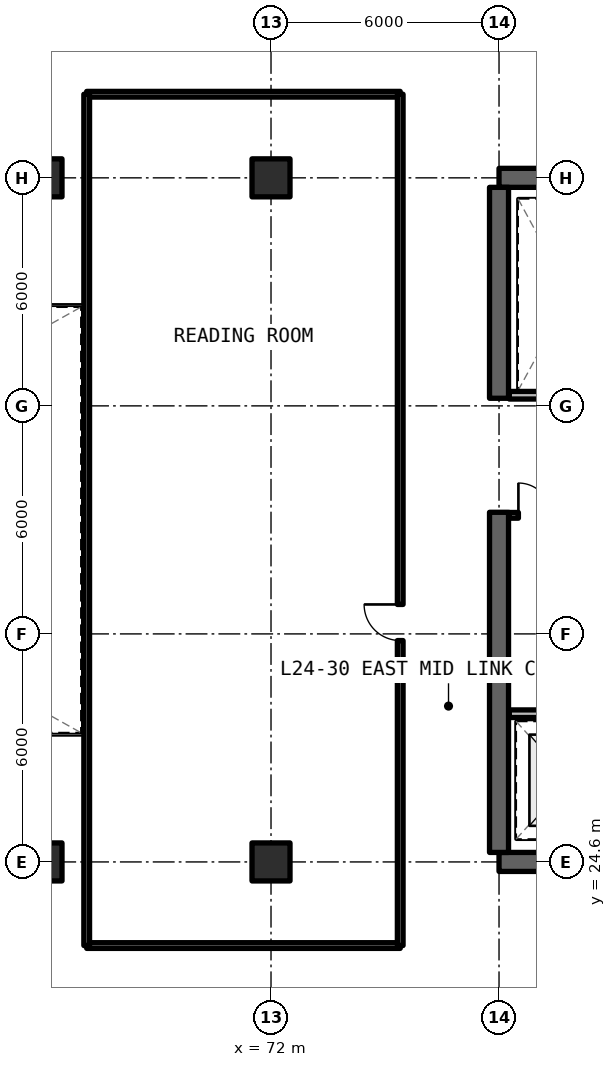
"""IFC4 building model, lengths in metres.
Left out: names, types, materials, properties, quantities, classifications, styles, units other than length and angle.
Written with IfcOpenShell. Run it as: python <this file> out.ifc"""

import sys

from ifc_helpers import new_model, si_unit, direction, frame, frame_2d, origin, origin_2d, place, context, subcontext, project, spatial, rectangle, extrude, element, fill, save


model = new_model("IFC4")
c1 = context("Model", 3, precision=1e-05, world=origin(), true_north=direction((0.0, 1.0)))
c2 = subcontext(c1, "Body", "Model", "MODEL_VIEW")
j1 = project(units=[si_unit("LENGTHUNIT", "METRE"), si_unit("PLANEANGLEUNIT", "RADIAN")], contexts=[c1])
p1 = place(None, origin())
s1 = spatial("IfcSite", under=j1, at=p1, CompositionType="ELEMENT")
p2 = place(p1, origin())
s2 = spatial("IfcBuilding", under=s1, at=p2, CompositionType="ELEMENT")
p3 = place(p2, frame((0.0, 0.0, 88.77)))
s3 = spatial("IfcBuildingStorey", under=s2, at=p3, CompositionType="ELEMENT", Elevation=88.77)
for number, where, z_axis, x_axis in (
    (1, (78.0, 24.6, 0.0), (0.0, 0.0, 1.0), (1.0, 0.0, 0.0)),
    (2, (90.0, 42.6, 0.0), (0.0, 0.0, 1.0), (-1.0, 0.0, 0.0)),
):
    element("IfcWall", number, at=place(p3, frame(where, z_axis=z_axis, x_axis=x_axis)), inside=s3, PredefinedType="SHEAR", context=c2, shape_type="SweptSolid", body=[
        extrude(rectangle(XDim=12.0, YDim=0.5, at=frame_2d((6.0, 0.0))), origin(), (0.0, 0.0, 1.0), 3.3),
    ])
p4 = place(p3, frame((78.0, 24.85, 0.0), z_axis=(0.0, 0.0, 1.0), x_axis=(0.0, 1.0, 0.0)))
e3 = element("IfcWall", 3, at=p4, inside=s3, PredefinedType="SHEAR", context=c2, shape_type="SweptSolid", body=[
    extrude(rectangle(XDim=8.95, YDim=0.5, at=frame_2d((4.475, 0.0))), origin(), (0.0, 0.0, 1.0), 3.3),
])
p5 = place(p3, frame((78.0, 36.8, 0.0), z_axis=(0.0, 0.0, 1.0), x_axis=(0.0, 1.0, 0.0)))
e4 = element("IfcWall", 4, at=p5, inside=s3, PredefinedType="SHEAR", context=c2, shape_type="SweptSolid", body=[
    extrude(rectangle(XDim=5.55, YDim=0.5, at=frame_2d((2.775, 0.0))), origin(), (0.0, 0.0, 1.0), 3.3),
])
for number, where, z_axis, x_axis in (
    (5, (66.0, 24.6, 0.0), (0.0, 0.0, 1.0), (1.0, 0.0, 0.0)),
    (6, (66.0, 42.6, 0.0), (0.0, 0.0, 1.0), (1.0, 0.0, 0.0)),
    (7, (72.0, 24.6, 0.0), (0.0, 0.0, 1.0), (1.0, 0.0, 0.0)),
    (8, (72.0, 42.6, 0.0), (0.0, 0.0, 1.0), (1.0, 0.0, 0.0)),
):
    element("IfcColumn", number, at=place(p3, frame(where, z_axis=z_axis, x_axis=x_axis)), inside=s3, PredefinedType="COLUMN", context=c2, shape_type="SweptSolid", body=[
        extrude(rectangle(XDim=1.0, YDim=1.0, at=origin_2d()), origin(), (0.0, 0.0, 1.0), 3.3),
    ])
p6 = place(p3, frame((78.27, 28.5, 0.0), z_axis=(0.0, 0.0, 1.0), x_axis=(1.0, 0.0, 0.0)))
e9 = element("IfcWall", 9, at=p6, inside=s3, PredefinedType="SOLIDWALL", context=c2, shape_type="SweptSolid", body=[
    extrude(rectangle(XDim=7.51, YDim=0.2, at=frame_2d((3.755, 0.0))), origin(), (0.0, 0.0, 1.0), 2.35),
])
p7 = place(p6, frame((3.53, 0.0, 0.0)))
e10 = element("IfcOpeningElement", 10, at=p7, cuts=e9, PredefinedType="OPENING", context=c2, shape_type="SweptSolid", body=[
    extrude(rectangle(XDim=1.0, YDim=2.15, at=frame_2d((0.5, 1.075))), frame((0.0, 0.11, 0.0), z_axis=(0.0, -1.0, 0.0), x_axis=(1.0, 0.0, 0.0)), (0.0, 0.0, 1.0), 0.22),
])
p8 = place(p3, frame((78.27, 33.72, 0.0), z_axis=(0.0, 0.0, 1.0), x_axis=(1.0, 0.0, 0.0)))
e11 = element("IfcWall", 11, at=p8, inside=s3, PredefinedType="SOLIDWALL", context=c2, shape_type="SweptSolid", body=[
    extrude(rectangle(XDim=1.37, YDim=0.15, at=frame_2d((0.685, 0.0))), origin(), (0.0, 0.0, 1.0), 2.35),
])
p9 = place(p8, frame((0.24, 0.0, 0.0)))
e12 = element("IfcOpeningElement", 12, at=p9, cuts=e11, PredefinedType="OPENING", context=c2, shape_type="SweptSolid", body=[
    extrude(rectangle(XDim=0.85, YDim=2.1, at=frame_2d((0.425, 1.05))), frame((0.0, 0.085, 0.0), z_axis=(0.0, -1.0, 0.0), x_axis=(1.0, 0.0, 0.0)), (0.0, 0.0, 1.0), 0.17),
])
p10 = place(p3, frame((78.27, 36.88, 0.0), z_axis=(0.0, 0.0, 1.0), x_axis=(1.0, 0.0, 0.0)))
e13 = element("IfcWall", 13, at=p10, inside=s3, PredefinedType="SOLIDWALL", context=c2, shape_type="SweptSolid", body=[
    extrude(rectangle(XDim=3.05, YDim=0.2, at=frame_2d((1.525, 0.0))), origin(), (0.0, 0.0, 1.0), 2.35),
])
for number, where, z_axis, x_axis in (
    (14, (67.15, 22.4, 0.0), (0.0, 0.0, 1.0), (1.0, 0.0, 0.0)),
    (15, (67.15, 44.8, 0.0), (0.0, 0.0, 1.0), (1.0, 0.0, 0.0)),
):
    element("IfcWall", number, at=place(p3, frame(where, z_axis=z_axis, x_axis=x_axis)), inside=s3, PredefinedType="SOLIDWALL", context=c2, shape_type="SweptSolid", body=[
        extrude(rectangle(XDim=8.25, YDim=0.15, at=frame_2d((4.125, 0.0))), origin(), (0.0, 0.0, 1.0), 2.35),
    ])
p11 = place(p3, frame((67.15, 22.4, 0.0), z_axis=(0.0, 0.0, 1.0), x_axis=(0.0, 1.0, 0.0)))
e16 = element("IfcWall", 16, at=p11, inside=s3, PredefinedType="SOLIDWALL", context=c2, shape_type="SweptSolid", body=[
    extrude(rectangle(XDim=22.4, YDim=0.15, at=frame_2d((11.2, 0.0))), origin(), (0.0, 0.0, 1.0), 2.35),
])
p12 = place(p3, frame((75.4, 22.4, 0.0), z_axis=(0.0, 0.0, 1.0), x_axis=(0.0, 1.0, 0.0)))
e17 = element("IfcWall", 17, at=p12, inside=s3, PredefinedType="SOLIDWALL", context=c2, shape_type="SweptSolid", body=[
    extrude(rectangle(XDim=22.4, YDim=0.15, at=frame_2d((11.2, 0.0))), origin(), (0.0, 0.0, 1.0), 2.35),
])
p13 = place(p12, frame((8.025, 0.0, 0.0)))
e18 = element("IfcOpeningElement", 18, at=p13, cuts=e17, PredefinedType="OPENING", context=c2, shape_type="SweptSolid", body=[
    extrude(rectangle(XDim=0.95, YDim=2.15, at=frame_2d((0.475, 1.075))), frame((0.0, 0.085, 0.0), z_axis=(0.0, -1.0, 0.0), x_axis=(1.0, 0.0, 0.0)), (0.0, 0.0, 1.0), 0.17),
])
p14 = place(p9, origin())
e19 = element("IfcDoor", 19, at=p14, inside=s3, OperationType="SINGLE_SWING_LEFT", PredefinedType="DOOR", context=c2, shape_type="SweptSolid", body=[
    extrude(rectangle(XDim=0.85, YDim=2.1, at=frame_2d((0.425, 1.05))), frame((0.0, 0.025, 0.0), z_axis=(0.0, -1.0, 0.0), x_axis=(1.0, 0.0, 0.0)), (0.0, 0.0, 1.0), 0.05),
])
fill(e12, e19)
p15 = place(p13, origin())
e20 = element("IfcDoor", 20, at=p15, inside=s3, OperationType="SINGLE_SWING_RIGHT", PredefinedType="DOOR", context=c2, shape_type="SweptSolid", body=[
    extrude(rectangle(XDim=0.95, YDim=2.15, at=frame_2d((0.475, 1.075))), frame((0.0, 0.025, 0.0), z_axis=(0.0, -1.0, 0.0), x_axis=(1.0, 0.0, 0.0)), (0.0, 0.0, 1.0), 0.05),
])
fill(e18, e20)
save(model, sys.argv[1])
